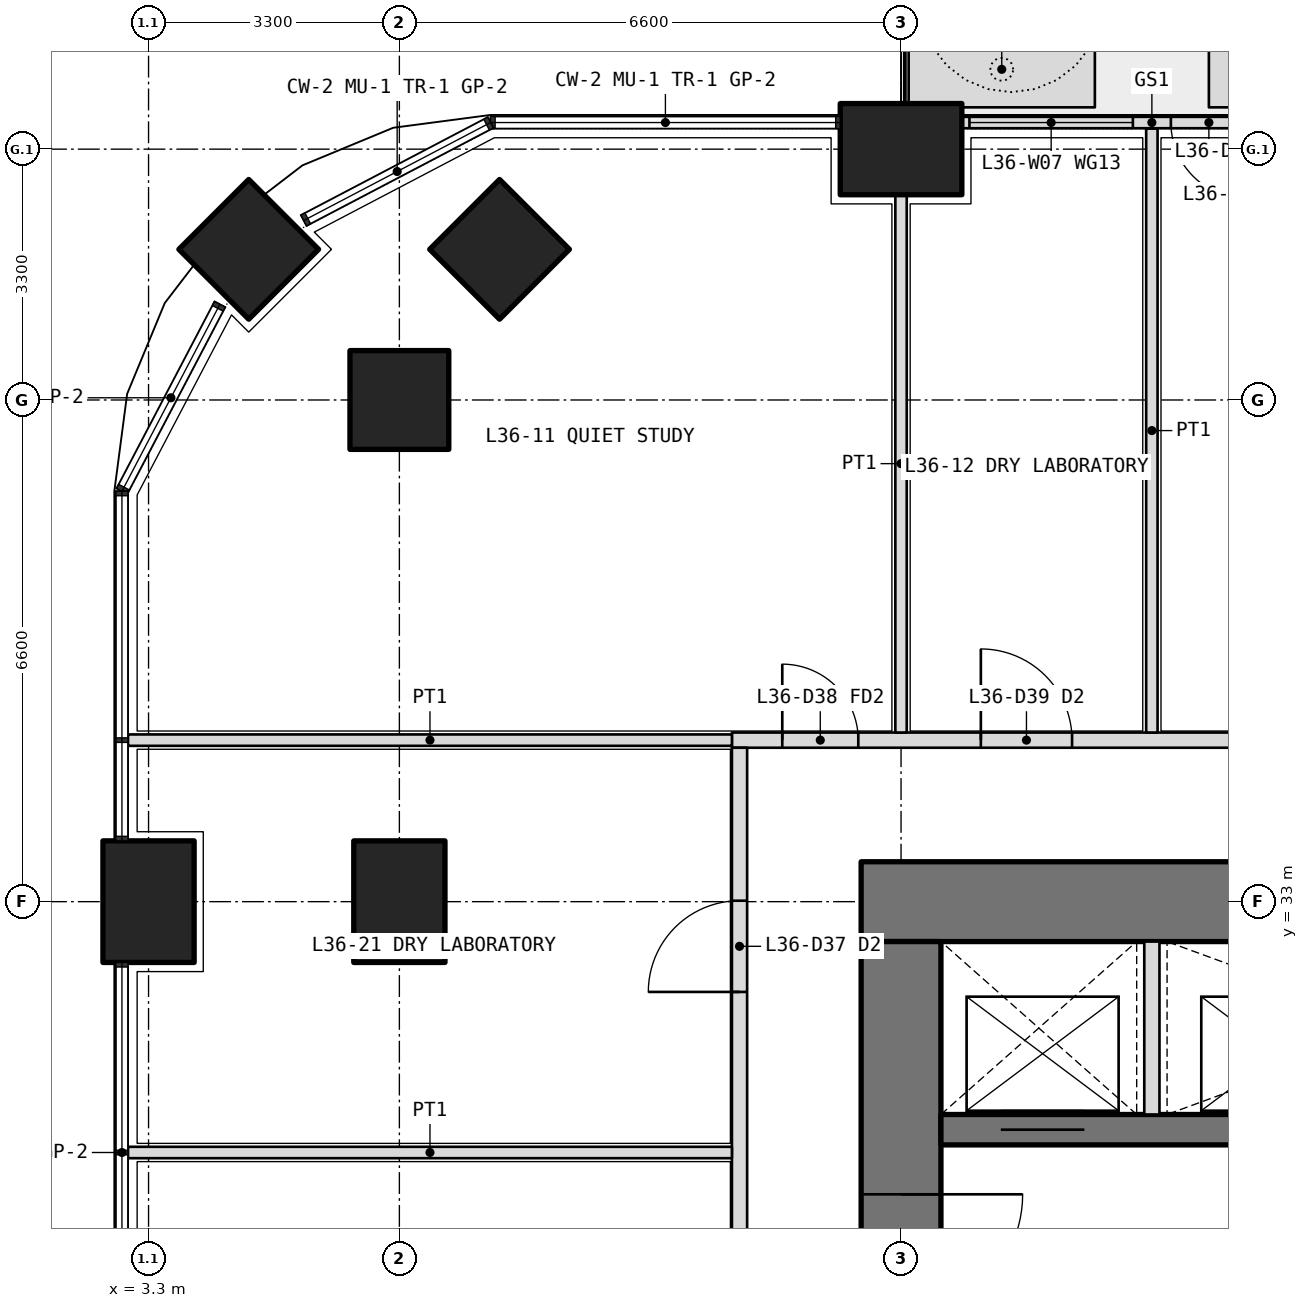
"""IFC4 building model, lengths in metres.
Left out: names, types, materials, properties, quantities, classifications, styles, units other than length and angle.
Written with IfcOpenShell. Run it as: python <this file> out.ifc"""

import sys

from ifc_helpers import new_model, si_unit, direction, frame, frame_2d, origin, origin_2d, place, context, subcontext, project, spatial, polyline, rectangle, outline, extrude, element, fill, save


model = new_model("IFC4")
c1 = context("Model", 3, precision=1e-05, world=origin(), true_north=direction((0.0, 1.0)))
c2 = subcontext(c1, "Body", "Model", "MODEL_VIEW")
j1 = project(units=[si_unit("LENGTHUNIT", "METRE"), si_unit("PLANEANGLEUNIT", "RADIAN")], contexts=[c1])
p1 = place(None, origin())
s1 = spatial("IfcSite", under=j1, at=p1, CompositionType="ELEMENT")
p2 = place(p1, origin())
s2 = spatial("IfcBuilding", under=s1, at=p2, CompositionType="ELEMENT")
p3 = place(p2, frame((0.0, 0.0, 159.9)))
s3 = spatial("IfcBuildingStorey", under=s2, at=p3, CompositionType="ELEMENT", Elevation=159.9)
p4 = place(p3, frame((4.618, 41.582, 0.0), z_axis=(0.0, 0.0, 1.0), x_axis=(0.707106781187, 0.707106781187, 0.0)))
e1 = element("IfcColumn", 1, at=p4, inside=s3, PredefinedType="COLUMN", context=c2, shape_type="SweptSolid", body=[
    extrude(rectangle(XDim=1.3, YDim=1.3, at=origin_2d()), origin(), (0.0, 0.0, 1.0), 4.2),
])
for number, where, z_axis, x_axis in (
    (2, (3.3, 33.0, 0.0), (0.0, 0.0, 1.0), (0.0, 1.0, 0.0)),
    (3, (13.2, 42.9, 0.0), (0.0, 0.0, 1.0), (1.0, 0.0, 0.0)),
):
    element("IfcColumn", number, at=place(p3, frame(where, z_axis=z_axis, x_axis=x_axis)), inside=s3, PredefinedType="COLUMN", context=c2, shape_type="SweptSolid", body=[
        extrude(rectangle(XDim=1.6, YDim=1.2, at=origin_2d()), origin(), (0.0, 0.0, 1.0), 4.2),
    ])
for number, where, z_axis, x_axis in (
    (4, (6.6, 39.6, 0.0), (0.0, 0.0, 1.0), (1.0, 0.0, 0.0)),
    (5, (7.918, 41.582, 0.0), (0.0, 0.0, 1.0), (0.707, 0.707, 0.0)),
):
    element("IfcColumn", number, at=place(p3, frame(where, z_axis=z_axis, x_axis=x_axis)), inside=s3, PredefinedType="COLUMN", context=c2, shape_type="SweptSolid", body=[
        extrude(rectangle(XDim=1.3, YDim=1.3, at=origin_2d()), origin(), (0.0, 0.0, 1.0), 4.2),
    ])
p5 = place(p3, frame((6.6, 33.0, 0.0), z_axis=(0.0, 0.0, 1.0), x_axis=(0.0, 1.0, 0.0)))
e6 = element("IfcColumn", 6, at=p5, inside=s3, PredefinedType="COLUMN", context=c2, shape_type="SweptSolid", body=[
    extrude(rectangle(XDim=1.6, YDim=1.2, at=origin_2d()), origin(), (0.0, 0.0, 1.0), 4.2),
])
p6 = place(p3, origin())
e7 = element("IfcWall", 7, at=p6, inside=s3, PredefinedType="USERDEFINED", context=c2, shape_type="SweptSolid", body=[
    extrude(outline(polyline([(13.3, 43.45), (15.75, 43.45), (15.75, 44.45), (13.3, 44.45), (13.3, 43.45)]), holes=[polyline([(13.45, 43.6), (15.6, 43.6), (15.6, 44.3), (13.45, 44.3), (13.45, 43.6)])]), origin(), (0.0, 0.0, 1.0), 1.05),
])
p7 = place(p3, origin())
e8 = element("IfcWall", 8, at=p7, inside=s3, PredefinedType="USERDEFINED", context=c2, shape_type="SweptSolid", body=[
    extrude(outline(polyline([(17.25, 43.45), (26.3, 43.45), (26.3, 44.45), (17.25, 44.45), (17.25, 43.45)]), holes=[polyline([(17.4, 43.6), (26.15, 43.6), (26.15, 44.3), (17.4, 44.3), (17.4, 43.6)])]), origin(), (0.0, 0.0, 1.0), 1.05),
])
p8 = place(p3, frame((19.0, 43.25, 0.0), z_axis=(0.0, 0.0, 1.0), x_axis=(-1.0, 0.0, 0.0)))
e9 = element("IfcWall", 9, at=p8, inside=s3, PredefinedType="SOLIDWALL", context=c2, shape_type="SweptSolid", body=[
    extrude(rectangle(XDim=5.0, YDim=0.15, at=frame_2d((2.5, 0.0))), origin(), (0.0, 0.0, 1.0), 2.7),
])
p9 = place(p8, frame((1.25, 0.0, 0.0)))
e10 = element("IfcOpeningElement", 10, at=p9, cuts=e9, PredefinedType="OPENING", context=c2, shape_type="SweptSolid", body=[
    extrude(rectangle(XDim=1.0, YDim=2.4, at=frame_2d((0.5, 1.2))), frame((0.0, 0.085, 0.0), z_axis=(0.0, -1.0, 0.0), x_axis=(1.0, 0.0, 0.0)), (0.0, 0.0, 1.0), 0.17),
])
p10 = place(p8, frame((0.1, 0.0, 0.1)))
e11 = element("IfcOpeningElement", 11, at=p10, cuts=e9, PredefinedType="OPENING", context=c2, shape_type="SweptSolid", body=[
    extrude(rectangle(XDim=1.05, YDim=2.3, at=frame_2d((0.525, 1.15))), frame((0.0, 0.085, 0.0), z_axis=(0.0, -1.0, 0.0), x_axis=(1.0, 0.0, 0.0)), (0.0, 0.0, 1.0), 0.17),
])
p11 = place(p8, frame((2.75, 0.0, 0.1)))
e12 = element("IfcOpeningElement", 12, at=p11, cuts=e9, PredefinedType="OPENING", context=c2, shape_type="SweptSolid", body=[
    extrude(rectangle(XDim=2.15, YDim=2.3, at=frame_2d((1.075, 1.15))), frame((0.0, 0.085, 0.0), z_axis=(0.0, -1.0, 0.0), x_axis=(1.0, 0.0, 0.0)), (0.0, 0.0, 1.0), 0.17),
])
p12 = place(p3, frame((40.125, 33.0, 0.0), z_axis=(0.0, 0.0, 1.0), x_axis=(-1.0, 0.0, 0.0)))
e13 = element("IfcWall", 13, at=p12, inside=s3, PredefinedType="SHEAR", context=c2, shape_type="SweptSolid", body=[
    extrude(rectangle(XDim=27.45, YDim=1.05, at=frame_2d((13.725, 0.0))), origin(), (0.0, 0.0, 1.0), 4.2),
])
p13 = place(p3, frame((13.2, 32.475, 0.0), z_axis=(0.0, 0.0, 1.0), x_axis=(0.0, -1.0, 0.0)))
e14 = element("IfcWall", 14, at=p13, inside=s3, PredefinedType="SHEAR", context=c2, shape_type="SweptSolid", body=[
    extrude(rectangle(XDim=18.75, YDim=1.05, at=frame_2d((9.375, 0.0))), origin(), (0.0, 0.0, 1.0), 4.2),
])
p14 = place(p13, frame((14.125, 0.0, 0.0)))
e15 = element("IfcOpeningElement", 15, at=p14, cuts=e14, PredefinedType="OPENING", context=c2, shape_type="SweptSolid", body=[
    extrude(rectangle(XDim=1.6, YDim=2.1, at=frame_2d((0.8, 1.05))), frame((0.0, 0.535, 0.0), z_axis=(0.0, -1.0, 0.0), x_axis=(1.0, 0.0, 0.0)), (0.0, 0.0, 1.0), 1.07),
])
p15 = place(p13, frame((3.325, 0.0, 0.0)))
e16 = element("IfcOpeningElement", 16, at=p15, cuts=e14, PredefinedType="OPENING", context=c2, shape_type="SweptSolid", body=[
    extrude(rectangle(XDim=1.6, YDim=2.1, at=frame_2d((0.8, 1.05))), frame((0.0, 0.535, 0.0), z_axis=(0.0, -1.0, 0.0), x_axis=(1.0, 0.0, 0.0)), (0.0, 0.0, 1.0), 1.07),
])
p16 = place(p3, frame((13.725, 30.0, 0.0), z_axis=(0.0, 0.0, 1.0), x_axis=(1.0, 0.0, 0.0)))
e17 = element("IfcWall", 17, at=p16, inside=s3, PredefinedType="SHEAR", context=c2, shape_type="SweptSolid", body=[
    extrude(rectangle(XDim=25.35, YDim=0.4, at=frame_2d((12.675, 0.0))), origin(), (0.0, 0.0, 1.0), 4.2),
])
p17 = place(p16, frame((0.788, 0.0, 0.0)))
e18 = element("IfcOpeningElement", 18, at=p17, cuts=e17, PredefinedType="OPENING", context=c2, shape_type="SweptSolid", body=[
    extrude(rectangle(XDim=1.1, YDim=2.1, at=frame_2d((0.55, 1.05))), frame((0.0, 0.21, 0.0), z_axis=(0.0, -1.0, 0.0), x_axis=(1.0, 0.0, 0.0)), (0.0, 0.0, 1.0), 0.42),
])
p18 = place(p16, frame((3.875, 0.0, 0.0)))
e19 = element("IfcOpeningElement", 19, at=p18, cuts=e17, PredefinedType="OPENING", context=c2, shape_type="SweptSolid", body=[
    extrude(rectangle(XDim=1.1, YDim=2.1, at=frame_2d((0.55, 1.05))), frame((0.0, 0.21, 0.0), z_axis=(0.0, -1.0, 0.0), x_axis=(1.0, 0.0, 0.0)), (0.0, 0.0, 1.0), 0.42),
])
p19 = place(p16, frame((7.175, 0.0, 0.0)))
e20 = element("IfcOpeningElement", 20, at=p19, cuts=e17, PredefinedType="OPENING", context=c2, shape_type="SweptSolid", body=[
    extrude(rectangle(XDim=1.1, YDim=2.1, at=frame_2d((0.55, 1.05))), frame((0.0, 0.21, 0.0), z_axis=(0.0, -1.0, 0.0), x_axis=(1.0, 0.0, 0.0)), (0.0, 0.0, 1.0), 0.42),
])
p20 = place(p16, frame((10.475, 0.0, 0.0)))
e21 = element("IfcOpeningElement", 21, at=p20, cuts=e17, PredefinedType="OPENING", context=c2, shape_type="SweptSolid", body=[
    extrude(rectangle(XDim=1.1, YDim=2.1, at=frame_2d((0.55, 1.05))), frame((0.0, 0.21, 0.0), z_axis=(0.0, -1.0, 0.0), x_axis=(1.0, 0.0, 0.0)), (0.0, 0.0, 1.0), 0.42),
])
p21 = place(p3, frame((16.5, 30.2, 0.0), z_axis=(0.0, 0.0, 1.0), x_axis=(0.0, 1.0, 0.0)))
e22 = element("IfcWall", 22, at=p21, inside=s3, PredefinedType="PARTITIONING", context=c2, shape_type="SweptSolid", body=[
    extrude(rectangle(XDim=2.275, YDim=0.2, at=frame_2d((1.138, 0.0))), origin(), (0.0, 0.0, 1.0), 4.2),
])
p22 = place(p3, frame((10.975, 35.125, 0.0), z_axis=(0.0, 0.0, 1.0), x_axis=(1.0, 0.0, 0.0)))
e23 = element("IfcWall", 23, at=p22, inside=s3, PredefinedType="PARTITIONING", context=c2, shape_type="SweptSolid", body=[
    extrude(rectangle(XDim=30.85, YDim=0.2, at=frame_2d((15.425, 0.0))), origin(), (0.0, 0.0, 1.0), 2.85),
])
p23 = place(p22, frame((0.663, 0.0, 0.0)))
e24 = element("IfcOpeningElement", 24, at=p23, cuts=e23, PredefinedType="OPENING", context=c2, shape_type="SweptSolid", body=[
    extrude(rectangle(XDim=1.0, YDim=2.1, at=frame_2d((0.5, 1.05))), frame((0.0, 0.11, 0.0), z_axis=(0.0, -1.0, 0.0), x_axis=(1.0, 0.0, 0.0)), (0.0, 0.0, 1.0), 0.22),
])
p24 = place(p22, frame((3.275, 0.0, 0.0)))
e25 = element("IfcOpeningElement", 25, at=p24, cuts=e23, PredefinedType="OPENING", context=c2, shape_type="SweptSolid", body=[
    extrude(rectangle(XDim=1.2, YDim=2.1, at=frame_2d((0.6, 1.05))), frame((0.0, 0.11, 0.0), z_axis=(0.0, -1.0, 0.0), x_axis=(1.0, 0.0, 0.0)), (0.0, 0.0, 1.0), 0.22),
])
p25 = place(p22, frame((11.625, 0.0, 0.0)))
e26 = element("IfcOpeningElement", 26, at=p25, cuts=e23, PredefinedType="OPENING", context=c2, shape_type="SweptSolid", body=[
    extrude(rectangle(XDim=1.0, YDim=2.1, at=frame_2d((0.5, 1.05))), frame((0.0, 0.11, 0.0), z_axis=(0.0, -1.0, 0.0), x_axis=(1.0, 0.0, 0.0)), (0.0, 0.0, 1.0), 0.22),
])
p26 = place(p22, frame((24.137, 0.0, 0.0)))
e27 = element("IfcOpeningElement", 27, at=p26, cuts=e23, PredefinedType="OPENING", context=c2, shape_type="SweptSolid", body=[
    extrude(rectangle(XDim=1.2, YDim=2.1, at=frame_2d((0.6, 1.05))), frame((0.0, 0.11, 0.0), z_axis=(0.0, -1.0, 0.0), x_axis=(1.0, 0.0, 0.0)), (0.0, 0.0, 1.0), 0.22),
])
p27 = place(p3, frame((11.075, 11.175, 0.0), z_axis=(0.0, 0.0, 1.0), x_axis=(0.0, 1.0, 0.0)))
e28 = element("IfcWall", 28, at=p27, inside=s3, PredefinedType="PARTITIONING", context=c2, shape_type="SweptSolid", body=[
    extrude(rectangle(XDim=23.85, YDim=0.2, at=frame_2d((11.925, 0.0))), origin(), (0.0, 0.0, 1.0), 2.85),
])
p28 = place(p27, frame((0.363, 0.0, 0.0)))
e29 = element("IfcOpeningElement", 29, at=p28, cuts=e28, PredefinedType="OPENING", context=c2, shape_type="SweptSolid", body=[
    extrude(rectangle(XDim=1.2, YDim=2.1, at=frame_2d((0.6, 1.05))), frame((0.0, 0.11, 0.0), z_axis=(0.0, -1.0, 0.0), x_axis=(1.0, 0.0, 0.0)), (0.0, 0.0, 1.0), 0.22),
])
p29 = place(p27, frame((3.125, 0.0, 0.0)))
e30 = element("IfcOpeningElement", 30, at=p29, cuts=e28, PredefinedType="OPENING", context=c2, shape_type="SweptSolid", body=[
    extrude(rectangle(XDim=1.0, YDim=2.1, at=frame_2d((0.5, 1.05))), frame((0.0, 0.11, 0.0), z_axis=(0.0, -1.0, 0.0), x_axis=(1.0, 0.0, 0.0)), (0.0, 0.0, 1.0), 0.22),
])
p30 = place(p27, frame((6.475, 0.0, 0.0)))
e31 = element("IfcOpeningElement", 31, at=p30, cuts=e28, PredefinedType="OPENING", context=c2, shape_type="SweptSolid", body=[
    extrude(rectangle(XDim=0.9, YDim=2.1, at=frame_2d((0.45, 1.05))), frame((0.0, 0.11, 0.0), z_axis=(0.0, -1.0, 0.0), x_axis=(1.0, 0.0, 0.0)), (0.0, 0.0, 1.0), 0.22),
])
p31 = place(p27, frame((9.675, 0.0, 0.0)))
e32 = element("IfcOpeningElement", 32, at=p31, cuts=e28, PredefinedType="OPENING", context=c2, shape_type="SweptSolid", body=[
    extrude(rectangle(XDim=0.9, YDim=2.1, at=frame_2d((0.45, 1.05))), frame((0.0, 0.11, 0.0), z_axis=(0.0, -1.0, 0.0), x_axis=(1.0, 0.0, 0.0)), (0.0, 0.0, 1.0), 0.22),
])
p32 = place(p27, frame((12.925, 0.0, 0.0)))
e33 = element("IfcOpeningElement", 33, at=p32, cuts=e28, PredefinedType="OPENING", context=c2, shape_type="SweptSolid", body=[
    extrude(rectangle(XDim=1.0, YDim=2.1, at=frame_2d((0.5, 1.05))), frame((0.0, 0.11, 0.0), z_axis=(0.0, -1.0, 0.0), x_axis=(1.0, 0.0, 0.0)), (0.0, 0.0, 1.0), 0.22),
])
p33 = place(p27, frame((16.375, 0.0, 0.0)))
e34 = element("IfcOpeningElement", 34, at=p33, cuts=e28, PredefinedType="OPENING", context=c2, shape_type="SweptSolid", body=[
    extrude(rectangle(XDim=1.0, YDim=2.1, at=frame_2d((0.5, 1.05))), frame((0.0, 0.11, 0.0), z_axis=(0.0, -1.0, 0.0), x_axis=(1.0, 0.0, 0.0)), (0.0, 0.0, 1.0), 0.22),
])
p34 = place(p27, frame((20.637, 0.0, 0.0)))
e35 = element("IfcOpeningElement", 35, at=p34, cuts=e28, PredefinedType="OPENING", context=c2, shape_type="SweptSolid", body=[
    extrude(rectangle(XDim=1.2, YDim=2.1, at=frame_2d((0.6, 1.05))), frame((0.0, 0.11, 0.0), z_axis=(0.0, -1.0, 0.0), x_axis=(1.0, 0.0, 0.0)), (0.0, 0.0, 1.0), 0.22),
])
p35 = place(p3, frame((3.03, 35.125, 0.0), z_axis=(0.0, 0.0, 1.0), x_axis=(1.0, 0.0, 0.0)))
e36 = element("IfcWall", 36, at=p35, inside=s3, PredefinedType="PARTITIONING", context=c2, shape_type="SweptSolid", body=[
    extrude(rectangle(XDim=7.945, YDim=0.15, at=frame_2d((3.973, 0.0))), origin(), (0.0, 0.0, 1.0), 2.7),
])
p36 = place(p3, frame((13.2, 42.3, 0.0), z_axis=(0.0, 0.0, 1.0), x_axis=(0.0, -1.0, 0.0)))
e37 = element("IfcWall", 37, at=p36, inside=s3, PredefinedType="PARTITIONING", context=c2, shape_type="SweptSolid", body=[
    extrude(rectangle(XDim=7.075, YDim=0.15, at=frame_2d((3.538, 0.0))), origin(), (0.0, 0.0, 1.0), 2.85),
])
p37 = place(p3, frame((16.5, 43.17, 0.0), z_axis=(0.0, 0.0, 1.0), x_axis=(0.0, -1.0, 0.0)))
e38 = element("IfcWall", 38, at=p37, inside=s3, PredefinedType="PARTITIONING", context=c2, shape_type="SweptSolid", body=[
    extrude(rectangle(XDim=7.945, YDim=0.15, at=frame_2d((3.972, 0.0))), origin(), (0.0, 0.0, 1.0), 2.7),
])
p38 = place(p3, frame((3.03, 29.7, 0.0), z_axis=(0.0, 0.0, 1.0), x_axis=(1.0, 0.0, 0.0)))
e39 = element("IfcWall", 39, at=p38, inside=s3, PredefinedType="PARTITIONING", context=c2, shape_type="SweptSolid", body=[
    extrude(rectangle(XDim=7.945, YDim=0.15, at=frame_2d((3.973, 0.0))), origin(), (0.0, 0.0, 1.0), 2.7),
])
p39 = place(p9, origin())
e40 = element("IfcDoor", 40, at=p39, inside=s3, OperationType="SINGLE_SWING_LEFT", PredefinedType="DOOR", context=c2, shape_type="SweptSolid", body=[
    extrude(rectangle(XDim=1.0, YDim=2.4, at=frame_2d((0.5, 1.2))), frame((0.0, 0.025, 0.0), z_axis=(0.0, -1.0, 0.0), x_axis=(1.0, 0.0, 0.0)), (0.0, 0.0, 1.0), 0.05),
])
fill(e10, e40)
p40 = place(p11, origin())
e41 = element("IfcWindow", 41, at=p40, inside=s3, PartitioningType="SINGLE_PANEL", PredefinedType="WINDOW", context=c2, shape_type="SweptSolid", body=[
    extrude(rectangle(XDim=2.15, YDim=2.3, at=frame_2d((1.075, 1.15))), frame((0.0, 0.03, 0.0), z_axis=(0.0, -1.0, 0.0), x_axis=(1.0, 0.0, 0.0)), (0.0, 0.0, 1.0), 0.06),
])
fill(e12, e41)
p41 = place(p23, origin())
e42 = element("IfcDoor", 42, at=p41, inside=s3, OperationType="SINGLE_SWING_LEFT", PredefinedType="DOOR", context=c2, shape_type="SweptSolid", body=[
    extrude(rectangle(XDim=1.0, YDim=2.1, at=frame_2d((0.5, 1.05))), frame((0.0, 0.025, 0.0), z_axis=(0.0, -1.0, 0.0), x_axis=(1.0, 0.0, 0.0)), (0.0, 0.0, 1.0), 0.05),
])
fill(e24, e42)
p42 = place(p24, origin())
e43 = element("IfcDoor", 43, at=p42, inside=s3, OperationType="DOUBLE_DOOR_SINGLE_SWING", PredefinedType="DOOR", context=c2, shape_type="SweptSolid", body=[
    extrude(rectangle(XDim=1.2, YDim=2.1, at=frame_2d((0.6, 1.05))), frame((0.0, 0.025, 0.0), z_axis=(0.0, -1.0, 0.0), x_axis=(1.0, 0.0, 0.0)), (0.0, 0.0, 1.0), 0.05),
])
fill(e25, e43)
p43 = place(p34, origin())
e44 = element("IfcDoor", 44, at=p43, inside=s3, OperationType="DOUBLE_DOOR_SINGLE_SWING", PredefinedType="DOOR", context=c2, shape_type="SweptSolid", body=[
    extrude(rectangle(XDim=1.2, YDim=2.1, at=frame_2d((0.6, 1.05))), frame((0.0, 0.025, 0.0), z_axis=(0.0, -1.0, 0.0), x_axis=(1.0, 0.0, 0.0)), (0.0, 0.0, 1.0), 0.05),
])
fill(e35, e44)
p44 = place(p15, origin())
e45 = element("IfcDoor", 45, at=p44, inside=s3, OperationType="DOUBLE_DOOR_DOUBLE_SWING", PredefinedType="DOOR", context=c2, shape_type="SweptSolid", body=[
    extrude(rectangle(XDim=1.6, YDim=2.1, at=frame_2d((0.8, 1.05))), frame((0.0, 0.025, 0.0), z_axis=(0.0, -1.0, 0.0), x_axis=(1.0, 0.0, 0.0)), (0.0, 0.0, 1.0), 0.05),
])
fill(e16, e45)
p45 = place(p17, origin())
e46 = element("IfcDoor", 46, at=p45, inside=s3, OperationType="DOUBLE_DOOR_SLIDING", PredefinedType="DOOR", context=c2, shape_type="SweptSolid", body=[
    extrude(rectangle(XDim=1.1, YDim=2.1, at=frame_2d((0.55, 1.05))), frame((0.0, 0.025, 0.0), z_axis=(0.0, -1.0, 0.0), x_axis=(1.0, 0.0, 0.0)), (0.0, 0.0, 1.0), 0.05),
])
fill(e18, e46)
save(model, sys.argv[1])
